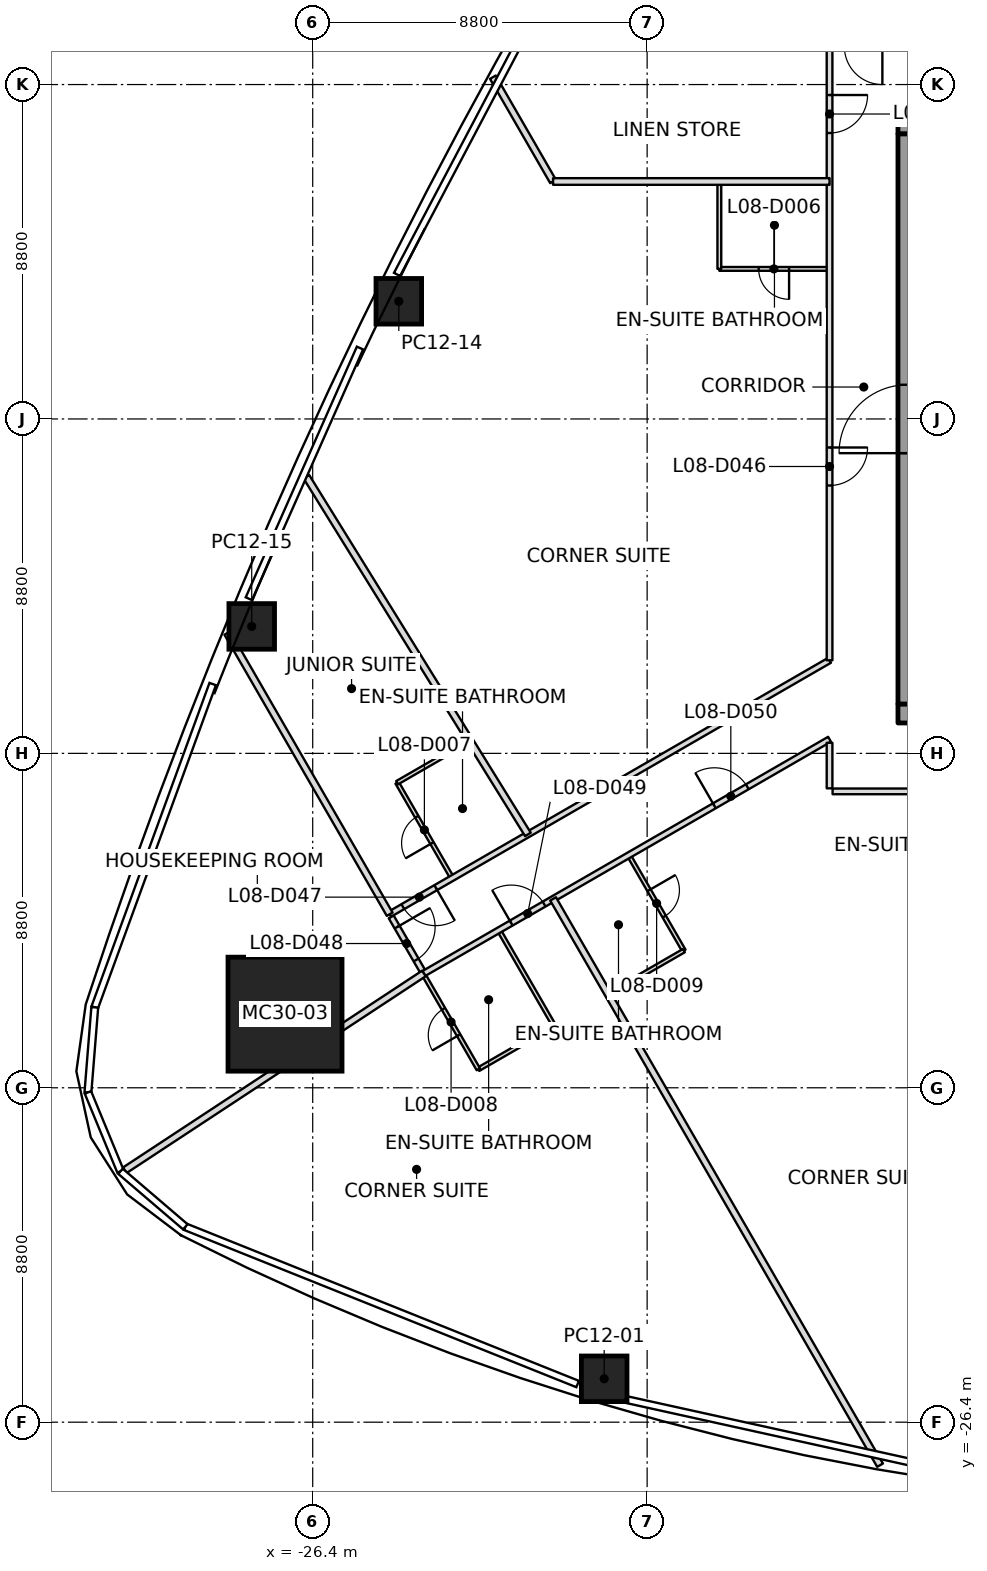
"""IFC4 building model, lengths in metres.
Left out: names, types, materials, properties, quantities, classifications, styles, units other than length and angle.
Written with IfcOpenShell. Run it as: python <this file> out.ifc"""

import sys

from ifc_helpers import new_model, si_unit, direction, frame, frame_2d, origin, origin_2d, place, context, subcontext, project, spatial, rectangle, extrude, clip, halfspace, element, fill, save


model = new_model("IFC4")
c1 = context("Model", 3, precision=1e-05, world=origin(), true_north=direction((0.0, 1.0)))
c2 = subcontext(c1, "Body", "Model", "MODEL_VIEW")
j1 = project(units=[si_unit("LENGTHUNIT", "METRE"), si_unit("PLANEANGLEUNIT", "RADIAN")], contexts=[c1])
p1 = place(None, origin())
s1 = spatial("IfcSite", under=j1, at=p1, CompositionType="ELEMENT")
p2 = place(p1, origin())
s2 = spatial("IfcBuilding", under=s1, at=p2, CompositionType="ELEMENT")
p3 = place(p2, frame((0.0, 0.0, 51.7)))
s3 = spatial("IfcBuildingStorey", under=s2, at=p3, CompositionType="ELEMENT", Elevation=51.7)
p4 = place(p3, frame((-27.128, -15.663, 0.0), z_axis=(0.030531992032, 0.017607001884, 0.999378702468), x_axis=(0.999533790055, -0.000537827582, -0.03052725469)))
e1 = element("IfcColumn", 1, at=p4, inside=s3, PredefinedType="COLUMN", context=c2, shape_type="SweptSolid", body=[
    extrude(rectangle(XDim=3.0, YDim=3.0, at=origin_2d()), origin(), (0.0, 0.0, 1.0), 3.702),
])
p5 = place(p3, frame((-18.73, -25.258, 0.0), z_axis=(0.018960260892, 0.176875858454, 0.984050526753), x_axis=(-0.957447491583, 0.286704825548, -0.033085402656)))
e2 = element("IfcColumn", 2, at=p5, inside=s3, PredefinedType="COLUMN", context=c2, shape_type="SweptSolid", body=[
    clip(clip(extrude(rectangle(XDim=1.2, YDim=1.2, at=origin_2d()), origin(), (0.0, 0.0, 1.0), 3.76), halfspace(frame((0.0, 0.0, 0.001)), True)), halfspace(frame((0.0, 0.0, 3.759)), False)),
])
p6 = place(p3, frame((-24.135, 3.097, 0.0), z_axis=(0.015306644787, 0.002309192102, 0.99988017995), x_axis=(0.441869025953, 0.897036057616, -0.008836019534)))
e3 = element("IfcColumn", 3, at=p6, inside=s3, PredefinedType="COLUMN", context=c2, shape_type="SweptSolid", body=[
    extrude(rectangle(XDim=1.2, YDim=1.2, at=origin_2d()), origin(), (0.0, 0.0, 1.0), 3.7),
])
p7 = place(p3, frame((-28.005, -5.459, 0.0), z_axis=(0.019460655113, 0.011016709844, 0.999749926235), x_axis=(0.381854725948, 0.924054467724, -0.017615588272)))
e4 = element("IfcColumn", 4, at=p7, inside=s3, PredefinedType="COLUMN", context=c2, shape_type="SweptSolid", body=[
    extrude(rectangle(XDim=1.2, YDim=1.2, at=origin_2d()), origin(), (0.0, 0.0, 1.0), 3.701),
])
p8 = place(p3, frame((-11.0, -7.75, 0.0), z_axis=(0.0, 0.0, 1.0), x_axis=(1.0, 0.0, 0.0)))
e5 = element("IfcWall", 5, at=p8, inside=s3, PredefinedType="SHEAR", context=c2, shape_type="SweptSolid", body=[
    extrude(rectangle(XDim=22.0, YDim=0.5, at=frame_2d((11.0, 0.0))), origin(), (0.0, 0.0, 1.0), 3.7),
])
p9 = place(p8, frame((10.45, 0.0, 0.0)))
e6 = element("IfcOpeningElement", 6, at=p9, cuts=e5, PredefinedType="OPENING", context=c2, shape_type="SweptSolid", body=[
    extrude(rectangle(XDim=1.1, YDim=2.1, at=frame_2d((0.55, 1.05))), frame((0.0, 0.25, 0.0), z_axis=(0.0, -1.0, 0.0), x_axis=(1.0, 0.0, 0.0)), (0.0, 0.0, 1.0), 0.5),
])
p10 = place(p3, frame((-11.0, 7.75, 0.0), z_axis=(0.0, 0.0, 1.0), x_axis=(1.0, 0.0, 0.0)))
e7 = element("IfcWall", 7, at=p10, inside=s3, PredefinedType="SHEAR", context=c2, shape_type="SweptSolid", body=[
    extrude(rectangle(XDim=22.0, YDim=0.5, at=frame_2d((11.0, 0.0))), origin(), (0.0, 0.0, 1.0), 3.7),
])
p11 = place(p10, frame((10.45, 0.0, 0.0)))
e8 = element("IfcOpeningElement", 8, at=p11, cuts=e7, PredefinedType="OPENING", context=c2, shape_type="SweptSolid", body=[
    extrude(rectangle(XDim=1.1, YDim=2.1, at=frame_2d((0.55, 1.05))), frame((0.0, 0.25, 0.0), z_axis=(0.0, -1.0, 0.0), x_axis=(1.0, 0.0, 0.0)), (0.0, 0.0, 1.0), 0.5),
])
p12 = place(p3, frame((-10.75, -7.5, 0.0), z_axis=(0.0, 0.0, 1.0), x_axis=(0.0, 1.0, 0.0)))
e9 = element("IfcWall", 9, at=p12, inside=s3, PredefinedType="SHEAR", context=c2, shape_type="SweptSolid", body=[
    extrude(rectangle(XDim=15.0, YDim=0.5, at=frame_2d((7.5, 0.0))), origin(), (0.0, 0.0, 1.0), 3.7),
])
p13 = place(p12, frame((6.6, 0.0, 0.0)))
e10 = element("IfcOpeningElement", 10, at=p13, cuts=e9, PredefinedType="OPENING", context=c2, shape_type="SweptSolid", body=[
    extrude(rectangle(XDim=1.8, YDim=2.1, at=frame_2d((0.9, 1.05))), frame((0.0, 0.25, 0.0), z_axis=(0.0, -1.0, 0.0), x_axis=(1.0, 0.0, 0.0)), (0.0, 0.0, 1.0), 0.5),
])
p14 = place(p3, frame((-31.345, -19.771, 0.0), z_axis=(0.0, 0.0, 1.0), x_axis=(0.835383891016, 0.549666948825, 0.0)))
e11 = element("IfcWall", 11, at=p14, inside=s3, PredefinedType="PARTITIONING", context=c2, shape_type="SweptSolid", body=[
    extrude(rectangle(XDim=9.422, YDim=0.175, at=frame_2d((4.711, 0.0))), origin(), (0.0, 0.0, 1.0), 2.934),
])
p15 = place(p3, frame((-24.374, -13.033, 0.0), z_axis=(0.0, 0.0, 1.0), x_axis=(-0.499992885873, 0.866029511089, 0.0)))
e12 = element("IfcWall", 12, at=p15, inside=s3, PredefinedType="PARTITIONING", context=c2, shape_type="SweptSolid", body=[
    extrude(rectangle(XDim=8.544, YDim=0.175, at=frame_2d((4.272, 0.0))), origin(), (0.0, 0.0, 1.0), 2.934),
])
p16 = place(p3, frame((-20.737, -10.933, 0.0), z_axis=(0.0, 0.0, 1.0), x_axis=(-0.526556478625, 0.850140150103, 0.0)))
e13 = element("IfcWall", 13, at=p16, inside=s3, PredefinedType="PARTITIONING", context=c2, shape_type="SweptSolid", body=[
    extrude(rectangle(XDim=11.074, YDim=0.175, at=frame_2d((5.537, 0.0))), origin(), (0.0, 0.0, 1.0), 2.934),
])
p17 = place(p3, frame((-21.659, 8.994, 0.0), z_axis=(0.0, 0.0, 1.0), x_axis=(0.49996696679, -0.866044474677, 0.0)))
e14 = element("IfcWall", 14, at=p17, inside=s3, PredefinedType="PARTITIONING", context=c2, shape_type="SweptSolid", body=[
    extrude(rectangle(XDim=3.169, YDim=0.175, at=frame_2d((1.584, 0.0))), origin(), (0.0, 0.0, 1.0), 2.934),
])
p18 = place(p3, frame((-20.075, 6.249, 0.0), z_axis=(0.0, 0.0, 1.0), x_axis=(1.0, 0.0, 0.0)))
e15 = element("IfcWall", 15, at=p18, inside=s3, PredefinedType="PARTITIONING", context=c2, shape_type="SweptSolid", body=[
    extrude(rectangle(XDim=7.275, YDim=0.175, at=frame_2d((3.637, 0.0))), origin(), (0.0, 0.0, 1.0), 3.093),
])
p19 = place(p3, frame((-20.075, -12.629, 0.0), z_axis=(0.0, 0.0, 1.0), x_axis=(0.500011885049, -0.866018541839, 0.0)))
e16 = element("IfcWall", 16, at=p19, inside=s3, PredefinedType="PARTITIONING", context=c2, shape_type="SweptSolid", body=[
    extrude(rectangle(XDim=17.208, YDim=0.175, at=frame_2d((8.604, 0.0))), origin(), (0.0, 0.0, 1.0), 2.934),
])
p20 = place(p3, frame((-12.8, -6.351, 0.0), z_axis=(0.0, 0.0, 1.0), x_axis=(-0.866025574339, -0.499999704591, 0.0)))
e17 = element("IfcWall", 17, at=p20, inside=s3, PredefinedType="PARTITIONING", context=c2, shape_type="SweptSolid", body=[
    extrude(rectangle(XDim=13.365, YDim=0.15, at=frame_2d((6.682, 0.0))), origin(), (0.0, 0.0, 1.0), 2.947),
])
p21 = place(p20, frame((11.965, 0.0, 0.0)))
e18 = element("IfcOpeningElement", 18, at=p21, cuts=e17, PredefinedType="OPENING", context=c2, shape_type="SweptSolid", body=[
    extrude(rectangle(XDim=1.0, YDim=2.1, at=frame_2d((0.5, 1.05))), frame((0.0, 0.075, 0.0), z_axis=(0.0, -1.0, 0.0), x_axis=(1.0, 0.0, 0.0)), (0.0, 0.0, 1.0), 0.15),
])
p22 = place(p3, frame((-24.334, -13.103, 0.0), z_axis=(0.0, 0.0, 1.0), x_axis=(0.499959641417, -0.86604870357, 0.0)))
e19 = element("IfcWall", 19, at=p22, inside=s3, PredefinedType="PARTITIONING", context=c2, shape_type="SweptSolid", body=[
    extrude(rectangle(XDim=1.663, YDim=0.15, at=frame_2d((0.832, 0.0))), origin(), (0.0, 0.0, 1.0), 2.797),
])
p23 = place(p22, frame((0.31, 0.0, 0.0)))
e20 = element("IfcOpeningElement", 20, at=p23, cuts=e19, PredefinedType="OPENING", context=c2, shape_type="SweptSolid", body=[
    extrude(rectangle(XDim=1.0, YDim=2.1, at=frame_2d((0.5, 1.05))), frame((0.0, 0.075, 0.0), z_axis=(0.0, -1.0, 0.0), x_axis=(1.0, 0.0, 0.0)), (0.0, 0.0, 1.0), 0.15),
])
p24 = place(p3, frame((-23.474, -14.592, 0.0), z_axis=(0.0, 0.0, 1.0), x_axis=(0.866019666699, 0.500009936792, 0.0)))
e21 = element("IfcWall", 21, at=p24, inside=s3, PredefinedType="PARTITIONING", context=c2, shape_type="SweptSolid", body=[
    extrude(rectangle(XDim=12.325, YDim=0.15, at=frame_2d((6.163, 0.0))), origin(), (0.0, 0.0, 1.0), 2.797),
])
p25 = place(p24, frame((2.653, 0.0, 0.0)))
e22 = element("IfcOpeningElement", 22, at=p25, cuts=e21, PredefinedType="OPENING", context=c2, shape_type="SweptSolid", body=[
    extrude(rectangle(XDim=1.0, YDim=2.1, at=frame_2d((0.5, 1.05))), frame((0.0, 0.075, 0.0), z_axis=(0.0, -1.0, 0.0), x_axis=(1.0, 0.0, 0.0)), (0.0, 0.0, 1.0), 0.15),
])
p26 = place(p24, frame((8.825, 0.0, 0.0)))
e23 = element("IfcOpeningElement", 23, at=p26, cuts=e21, PredefinedType="OPENING", context=c2, shape_type="SweptSolid", body=[
    extrude(rectangle(XDim=1.0, YDim=2.1, at=frame_2d((0.5, 1.05))), frame((0.0, 0.075, 0.0), z_axis=(0.0, -1.0, 0.0), x_axis=(1.0, 0.0, 0.0)), (0.0, 0.0, 1.0), 0.15),
])
p27 = place(p3, frame((-12.8, -8.521, 0.0), z_axis=(0.0, 0.0, 1.0), x_axis=(0.0, -1.0, 0.0)))
e24 = element("IfcWall", 24, at=p27, inside=s3, PredefinedType="PARTITIONING", context=c2, shape_type="SweptSolid", body=[
    extrude(rectangle(XDim=1.199, YDim=0.15, at=frame_2d((0.6, 0.0))), origin(), (0.0, 0.0, 1.0), 2.797),
])
p28 = place(p3, frame((-12.8, 9.72, 0.0), z_axis=(0.0, 0.0, 1.0), x_axis=(0.0, -1.0, 0.0)))
e25 = element("IfcWall", 25, at=p28, inside=s3, PredefinedType="PARTITIONING", context=c2, shape_type="SweptSolid", body=[
    extrude(rectangle(XDim=16.071, YDim=0.15, at=frame_2d((8.035, 0.0))), origin(), (0.0, 0.0, 1.0), 3.017),
])
p29 = place(p28, frame((1.195, 0.0, 0.0)))
e26 = element("IfcOpeningElement", 26, at=p29, cuts=e25, PredefinedType="OPENING", context=c2, shape_type="SweptSolid", body=[
    extrude(rectangle(XDim=1.0, YDim=2.1, at=frame_2d((0.5, 1.05))), frame((0.0, 0.075, 0.0), z_axis=(0.0, -1.0, 0.0), x_axis=(1.0, 0.0, 0.0)), (0.0, 0.0, 1.0), 0.15),
])
p30 = place(p28, frame((10.471, 0.0, 0.0)))
e27 = element("IfcOpeningElement", 27, at=p30, cuts=e25, PredefinedType="OPENING", context=c2, shape_type="SweptSolid", body=[
    extrude(rectangle(XDim=1.0, YDim=2.1, at=frame_2d((0.5, 1.05))), frame((0.0, 0.075, 0.0), z_axis=(0.0, -1.0, 0.0), x_axis=(1.0, 0.0, 0.0)), (0.0, 0.0, 1.0), 0.15),
])
p31 = place(p3, frame((-12.72, -9.8, 0.0), z_axis=(0.0, 0.0, 1.0), x_axis=(1.0, 0.0, 0.0)))
e28 = element("IfcWall", 28, at=p31, inside=s3, PredefinedType="PARTITIONING", context=c2, shape_type="SweptSolid", body=[
    extrude(rectangle(XDim=25.44, YDim=0.15, at=frame_2d((12.72, 0.0))), origin(), (0.0, 0.0, 1.0), 2.947),
])
p32 = place(p31, frame((7.32, 0.0, 0.0)))
e29 = element("IfcOpeningElement", 29, at=p32, cuts=e28, PredefinedType="OPENING", context=c2, shape_type="SweptSolid", body=[
    extrude(rectangle(XDim=1.0, YDim=2.1, at=frame_2d((0.5, 1.05))), frame((0.0, 0.075, 0.0), z_axis=(0.0, -1.0, 0.0), x_axis=(1.0, 0.0, 0.0)), (0.0, 0.0, 1.0), 0.15),
])
p33 = place(p31, frame((11.52, 0.0, 0.0)))
e30 = element("IfcOpeningElement", 30, at=p33, cuts=e28, PredefinedType="OPENING", context=c2, shape_type="SweptSolid", body=[
    extrude(rectangle(XDim=1.0, YDim=2.1, at=frame_2d((0.5, 1.05))), frame((0.0, 0.075, 0.0), z_axis=(0.0, -1.0, 0.0), x_axis=(1.0, 0.0, 0.0)), (0.0, 0.0, 1.0), 0.15),
])
p34 = place(p31, frame((15.72, 0.0, 0.0)))
e31 = element("IfcOpeningElement", 31, at=p34, cuts=e28, PredefinedType="OPENING", context=c2, shape_type="SweptSolid", body=[
    extrude(rectangle(XDim=1.0, YDim=2.1, at=frame_2d((0.5, 1.05))), frame((0.0, 0.075, 0.0), z_axis=(0.0, -1.0, 0.0), x_axis=(1.0, 0.0, 0.0)), (0.0, 0.0, 1.0), 0.15),
])
p35 = place(p31, frame((19.92, 0.0, 0.0)))
e32 = element("IfcOpeningElement", 32, at=p35, cuts=e28, PredefinedType="OPENING", context=c2, shape_type="SweptSolid", body=[
    extrude(rectangle(XDim=1.0, YDim=2.1, at=frame_2d((0.5, 1.05))), frame((0.0, 0.075, 0.0), z_axis=(0.0, -1.0, 0.0), x_axis=(1.0, 0.0, 0.0)), (0.0, 0.0, 1.0), 0.15),
])
p36 = place(p3, frame((-21.485, -13.478, 0.0), z_axis=(0.0, 0.0, 1.0), x_axis=(0.499936001555, -0.866062350151, 0.0)))
e33 = element("IfcWall", 33, at=p36, inside=s3, PredefinedType="PARTITIONING", context=c2, shape_type="SweptSolid", body=[
    extrude(rectangle(XDim=2.87, YDim=0.1, at=frame_2d((1.435, 0.0))), origin(), (0.0, 0.0, 1.0), 3.15),
])
p37 = place(p3, frame((-20.05, -15.964, 0.0), z_axis=(0.0, 0.0, 1.0), x_axis=(-0.86602648383, -0.499998129301, 0.0)))
e34 = element("IfcWall", 34, at=p37, inside=s3, PredefinedType="PARTITIONING", context=c2, shape_type="SweptSolid", body=[
    extrude(rectangle(XDim=2.3, YDim=0.1, at=frame_2d((1.15, 0.0))), origin(), (0.0, 0.0, 1.0), 3.15),
])
p38 = place(p3, frame((-22.042, -17.114, 0.0), z_axis=(0.0, 0.0, 1.0), x_axis=(-0.500036638401, 0.866004249561, 0.0)))
e35 = element("IfcWall", 35, at=p38, inside=s3, PredefinedType="PARTITIONING", context=c2, shape_type="SweptSolid", body=[
    extrude(rectangle(XDim=2.87, YDim=0.1, at=frame_2d((1.435, 0.0))), origin(), (0.0, 0.0, 1.0), 3.15),
])
p39 = place(p38, frame((1.035, 0.0, 0.0)))
e36 = element("IfcOpeningElement", 36, at=p39, cuts=e35, PredefinedType="OPENING", context=c2, shape_type="SweptSolid", body=[
    extrude(rectangle(XDim=0.8, YDim=2.1, at=frame_2d((0.4, 1.05))), frame((0.0, 0.05, 0.0), z_axis=(0.0, -1.0, 0.0), x_axis=(1.0, 0.0, 0.0)), (0.0, 0.0, 1.0), 0.1),
])
p40 = place(p3, frame((-22.744, -12.057, 0.0), z_axis=(0.0, 0.0, 1.0), x_axis=(-0.499936001555, 0.866062350151, 0.0)))
e37 = element("IfcWall", 37, at=p40, inside=s3, PredefinedType="PARTITIONING", context=c2, shape_type="SweptSolid", body=[
    extrude(rectangle(XDim=2.87, YDim=0.1, at=frame_2d((1.435, 0.0))), origin(), (0.0, 0.0, 1.0), 3.15),
])
p41 = place(p40, frame((1.035, 0.0, 0.0)))
e38 = element("IfcOpeningElement", 38, at=p41, cuts=e37, PredefinedType="OPENING", context=c2, shape_type="SweptSolid", body=[
    extrude(rectangle(XDim=0.8, YDim=2.1, at=frame_2d((0.4, 1.05))), frame((0.0, 0.05, 0.0), z_axis=(0.0, -1.0, 0.0), x_axis=(1.0, 0.0, 0.0)), (0.0, 0.0, 1.0), 0.1),
])
p42 = place(p3, frame((-24.179, -9.572, 0.0), z_axis=(0.0, 0.0, 1.0), x_axis=(0.866017224141, 0.500014167291, 0.0)))
e39 = element("IfcWall", 39, at=p42, inside=s3, PredefinedType="PARTITIONING", context=c2, shape_type="SweptSolid", body=[
    extrude(rectangle(XDim=2.27, YDim=0.1, at=frame_2d((1.135, 0.0))), origin(), (0.0, 0.0, 1.0), 3.15),
])
p43 = place(p3, frame((-18.068, -11.505, 0.0), z_axis=(0.0, 0.0, 1.0), x_axis=(0.500036638401, -0.866004249561, 0.0)))
e40 = element("IfcWall", 40, at=p43, inside=s3, PredefinedType="PARTITIONING", context=c2, shape_type="SweptSolid", body=[
    extrude(rectangle(XDim=2.87, YDim=0.1, at=frame_2d((1.435, 0.0))), origin(), (0.0, 0.0, 1.0), 2.797),
])
p44 = place(p43, frame((1.035, 0.0, 0.0)))
e41 = element("IfcOpeningElement", 41, at=p44, cuts=e40, PredefinedType="OPENING", context=c2, shape_type="SweptSolid", body=[
    extrude(rectangle(XDim=0.8, YDim=2.1, at=frame_2d((0.4, 1.05))), frame((0.0, 0.05, 0.0), z_axis=(0.0, -1.0, 0.0), x_axis=(1.0, 0.0, 0.0)), (0.0, 0.0, 1.0), 0.1),
])
p45 = place(p3, frame((-16.633, -13.991, 0.0), z_axis=(0.0, 0.0, 1.0), x_axis=(-0.866017224141, -0.500014167291, 0.0)))
e42 = element("IfcWall", 42, at=p45, inside=s3, PredefinedType="PARTITIONING", context=c2, shape_type="SweptSolid", body=[
    extrude(rectangle(XDim=2.27, YDim=0.1, at=frame_2d((1.135, 0.0))), origin(), (0.0, 0.0, 1.0), 3.15),
])
p46 = place(p3, frame((-12.83, 3.949, 0.0), z_axis=(0.0, 0.0, 1.0), x_axis=(-1.0, 0.0, 0.0)))
e43 = element("IfcWall", 43, at=p46, inside=s3, PredefinedType="PARTITIONING", context=c2, shape_type="SweptSolid", body=[
    extrude(rectangle(XDim=2.87, YDim=0.1, at=frame_2d((1.435, 0.0))), origin(), (0.0, 0.0, 1.0), 3.093),
])
p47 = place(p46, frame((1.035, 0.0, 0.0)))
e44 = element("IfcOpeningElement", 44, at=p47, cuts=e43, PredefinedType="OPENING", context=c2, shape_type="SweptSolid", body=[
    extrude(rectangle(XDim=0.8, YDim=2.1, at=frame_2d((0.4, 1.05))), frame((0.0, 0.05, 0.0), z_axis=(0.0, -1.0, 0.0), x_axis=(1.0, 0.0, 0.0)), (0.0, 0.0, 1.0), 0.1),
])
p48 = place(p3, frame((-15.7, 3.949, 0.0), z_axis=(0.0, 0.0, 1.0), x_axis=(0.0, 1.0, 0.0)))
e45 = element("IfcWall", 45, at=p48, inside=s3, PredefinedType="PARTITIONING", context=c2, shape_type="SweptSolid", body=[
    extrude(rectangle(XDim=2.27, YDim=0.1, at=frame_2d((1.135, 0.0))), origin(), (0.0, 0.0, 1.0), 3.093),
])
p49 = place(p29, origin())
e46 = element("IfcDoor", 46, at=p49, inside=s3, OperationType="SINGLE_SWING_LEFT", PredefinedType="DOOR", context=c2, shape_type="SweptSolid", body=[
    extrude(rectangle(XDim=1.0, YDim=2.1, at=frame_2d((0.5, 1.05))), frame((0.0, 0.025, 0.0), z_axis=(0.0, -1.0, 0.0), x_axis=(1.0, 0.0, 0.0)), (0.0, 0.0, 1.0), 0.05),
])
fill(e26, e46)
p50 = place(p30, origin())
e47 = element("IfcDoor", 47, at=p50, inside=s3, OperationType="SINGLE_SWING_RIGHT", PredefinedType="DOOR", context=c2, shape_type="SweptSolid", body=[
    extrude(rectangle(XDim=1.0, YDim=2.1, at=frame_2d((0.5, 1.05))), frame((0.0, 0.025, 0.0), z_axis=(0.0, -1.0, 0.0), x_axis=(1.0, 0.0, 0.0)), (0.0, 0.0, 1.0), 0.05),
])
fill(e27, e47)
p51 = place(p47, origin())
e48 = element("IfcDoor", 48, at=p51, inside=s3, OperationType="SINGLE_SWING_LEFT", PredefinedType="DOOR", context=c2, shape_type="SweptSolid", body=[
    extrude(rectangle(XDim=0.8, YDim=2.1, at=frame_2d((0.4, 1.05))), frame((0.0, 0.025, 0.0), z_axis=(0.0, -1.0, 0.0), x_axis=(1.0, 0.0, 0.0)), (0.0, 0.0, 1.0), 0.05),
])
fill(e44, e48)
p52 = place(p21, origin())
e49 = element("IfcDoor", 49, at=p52, inside=s3, OperationType="SINGLE_SWING_LEFT", PredefinedType="DOOR", context=c2, shape_type="SweptSolid", body=[
    extrude(rectangle(XDim=1.0, YDim=2.1, at=frame_2d((0.5, 1.05))), frame((0.0, 0.025, 0.0), z_axis=(0.0, -1.0, 0.0), x_axis=(1.0, 0.0, 0.0)), (0.0, 0.0, 1.0), 0.05),
])
fill(e18, e49)
p53 = place(p41, origin())
e50 = element("IfcDoor", 50, at=p53, inside=s3, OperationType="SINGLE_SWING_RIGHT", PredefinedType="DOOR", context=c2, shape_type="SweptSolid", body=[
    extrude(rectangle(XDim=0.8, YDim=2.1, at=frame_2d((0.4, 1.05))), frame((0.0, 0.025, 0.0), z_axis=(0.0, -1.0, 0.0), x_axis=(1.0, 0.0, 0.0)), (0.0, 0.0, 1.0), 0.05),
])
fill(e38, e50)
p54 = place(p23, origin())
e51 = element("IfcDoor", 51, at=p54, inside=s3, OperationType="SINGLE_SWING_LEFT", PredefinedType="DOOR", context=c2, shape_type="SweptSolid", body=[
    extrude(rectangle(XDim=1.0, YDim=2.1, at=frame_2d((0.5, 1.05))), frame((0.0, 0.025, 0.0), z_axis=(0.0, -1.0, 0.0), x_axis=(1.0, 0.0, 0.0)), (0.0, 0.0, 1.0), 0.05),
])
fill(e20, e51)
p55 = place(p25, origin())
e52 = element("IfcDoor", 52, at=p55, inside=s3, OperationType="SINGLE_SWING_LEFT", PredefinedType="DOOR", context=c2, shape_type="SweptSolid", body=[
    extrude(rectangle(XDim=1.0, YDim=2.1, at=frame_2d((0.5, 1.05))), frame((0.0, 0.025, 0.0), z_axis=(0.0, -1.0, 0.0), x_axis=(1.0, 0.0, 0.0)), (0.0, 0.0, 1.0), 0.05),
])
fill(e22, e52)
p56 = place(p39, origin())
e53 = element("IfcDoor", 53, at=p56, inside=s3, OperationType="SINGLE_SWING_LEFT", PredefinedType="DOOR", context=c2, shape_type="SweptSolid", body=[
    extrude(rectangle(XDim=0.8, YDim=2.1, at=frame_2d((0.4, 1.05))), frame((0.0, 0.025, 0.0), z_axis=(0.0, -1.0, 0.0), x_axis=(1.0, 0.0, 0.0)), (0.0, 0.0, 1.0), 0.05),
])
fill(e36, e53)
p57 = place(p26, origin())
e54 = element("IfcDoor", 54, at=p57, inside=s3, OperationType="SINGLE_SWING_RIGHT", PredefinedType="DOOR", context=c2, shape_type="SweptSolid", body=[
    extrude(rectangle(XDim=1.0, YDim=2.1, at=frame_2d((0.5, 1.05))), frame((0.0, 0.025, 0.0), z_axis=(0.0, -1.0, 0.0), x_axis=(1.0, 0.0, 0.0)), (0.0, 0.0, 1.0), 0.05),
])
fill(e23, e54)
p58 = place(p44, origin())
e55 = element("IfcDoor", 55, at=p58, inside=s3, OperationType="SINGLE_SWING_RIGHT", PredefinedType="DOOR", context=c2, shape_type="SweptSolid", body=[
    extrude(rectangle(XDim=0.8, YDim=2.1, at=frame_2d((0.4, 1.05))), frame((0.0, 0.025, 0.0), z_axis=(0.0, -1.0, 0.0), x_axis=(1.0, 0.0, 0.0)), (0.0, 0.0, 1.0), 0.05),
])
fill(e41, e55)
p59 = place(p13, origin())
e56 = element("IfcDoor", 56, at=p59, inside=s3, OperationType="DOUBLE_DOOR_SINGLE_SWING", PredefinedType="DOOR", context=c2, shape_type="SweptSolid", body=[
    extrude(rectangle(XDim=1.8, YDim=2.1, at=frame_2d((0.9, 1.05))), frame((0.0, 0.025, 0.0), z_axis=(0.0, -1.0, 0.0), x_axis=(1.0, 0.0, 0.0)), (0.0, 0.0, 1.0), 0.05),
])
fill(e10, e56)
save(model, sys.argv[1])
